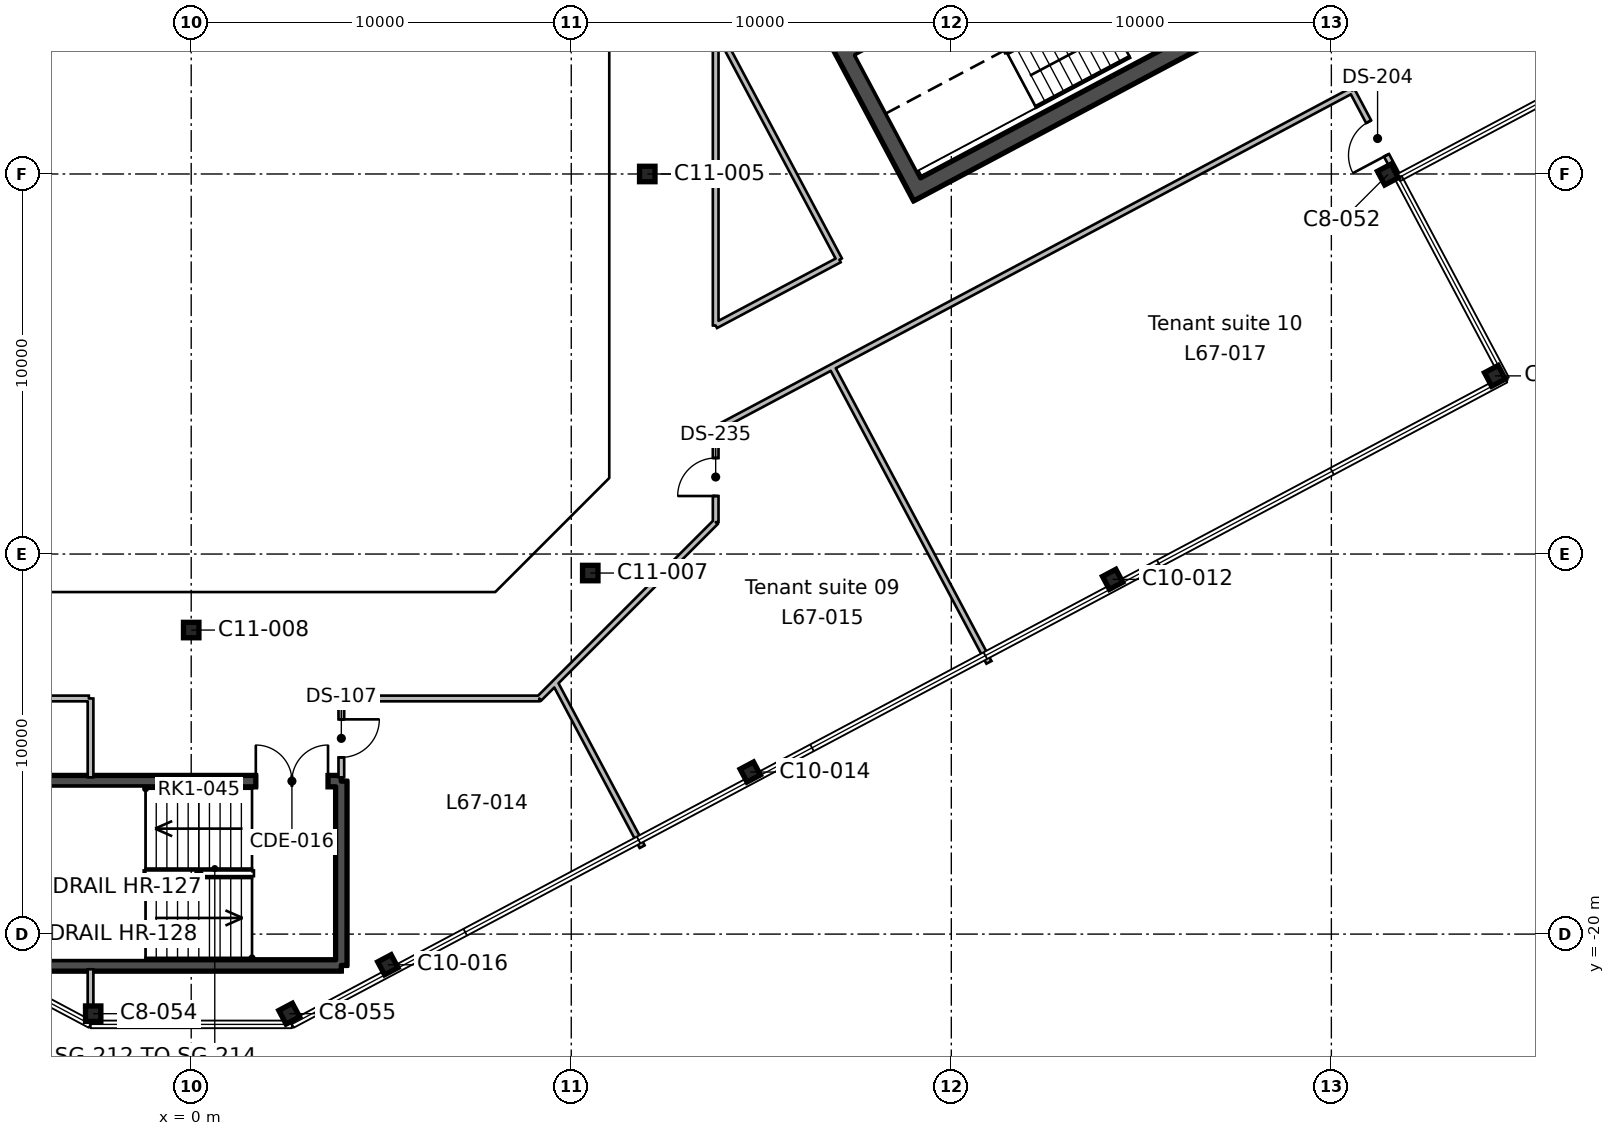
"""IFC4 building model, lengths in metres.
Left out: names, types, materials, properties, quantities, classifications, styles, units other than length and angle.
Written with IfcOpenShell. Run it as: python <this file> out.ifc"""

import sys

from ifc_helpers import new_model, si_unit, direction, frame, frame_2d, origin, origin_2d, place, context, subcontext, project, spatial, rectangle, hollow_rectangle, i_section, extrude, element, fill, save


model = new_model("IFC4")
c1 = context("Model", 3, precision=1e-05, world=origin(), true_north=direction((0.0, 1.0)))
c2 = subcontext(c1, "Body", "Model", "MODEL_VIEW")
j1 = project(units=[si_unit("LENGTHUNIT", "METRE"), si_unit("PLANEANGLEUNIT", "RADIAN")], contexts=[c1])
p1 = place(None, origin())
s1 = spatial("IfcSite", under=j1, at=p1, CompositionType="ELEMENT")
p2 = place(p1, origin())
s2 = spatial("IfcBuilding", under=s1, at=p2, CompositionType="ELEMENT")
p3 = place(p2, frame((0.0, 0.0, 297.0)))
s3 = spatial("IfcBuildingStorey", under=s2, at=p3, CompositionType="ELEMENT", Elevation=297.0)
for number, where, z_axis, x_axis in (
    (1, (-2.579, -22.094, 0.0), (0.0, 0.0, 1.0), (1.0, 0.0, 0.0)),
    (2, (2.579, -22.094, 0.0), (0.0, 0.0, 1.0), (0.883, 0.469, 0.0)),
):
    element("IfcColumn", number, at=place(p3, frame(where, z_axis=z_axis, x_axis=x_axis)), inside=s3, PredefinedType="COLUMN", context=c2, shape_type="SweptSolid", body=[
        extrude(i_section(OverallWidth=0.404, OverallDepth=0.406, WebThickness=0.027, FlangeThickness=0.044, FilletRadius=0.015, at=origin_2d()), origin(), (0.0, 0.0, 1.0), 3.9),
    ])
for number, where, z_axis, x_axis in (
    (3, (5.174, -20.807, 0.0), (0.0, 0.0, 1.0), (0.883, 0.469, 0.0)),
    (4, (14.71, -15.736, 0.0), (0.0, 0.0, 1.0), (0.883, 0.469, 0.0)),
):
    element("IfcColumn", number, at=place(p3, frame(where, z_axis=z_axis, x_axis=x_axis)), inside=s3, PredefinedType="COLUMN", context=c2, shape_type="SweptSolid", body=[
        extrude(i_section(OverallWidth=0.399, OverallDepth=0.386, WebThickness=0.021, FlangeThickness=0.033, FilletRadius=0.015, at=origin_2d()), origin(), (0.0, 0.0, 1.0), 3.9),
    ])
p4 = place(p3, frame((0.0, -12.0, 0.0), z_axis=(0.0, 0.0, 1.0), x_axis=(1.0, 0.0, 0.0)))
e5 = element("IfcColumn", 5, at=p4, inside=s3, PredefinedType="COLUMN", context=c2, shape_type="SweptSolid", body=[
    extrude(hollow_rectangle(XDim=0.406, YDim=0.406, WallThickness=0.009, InnerFilletRadius=0.004, OuterFilletRadius=0.013, at=origin_2d()), origin(), (0.0, 0.0, 1.0), 3.9),
])
p5 = place(p3, frame((24.245, -10.666, 0.0), z_axis=(0.0, 0.0, 1.0), x_axis=(0.882947592859, 0.469471562786, 0.0)))
e6 = element("IfcColumn", 6, at=p5, inside=s3, PredefinedType="COLUMN", context=c2, shape_type="SweptSolid", body=[
    extrude(i_section(OverallWidth=0.399, OverallDepth=0.386, WebThickness=0.021, FlangeThickness=0.033, FilletRadius=0.015, at=origin_2d()), origin(), (0.0, 0.0, 1.0), 3.9),
])
p6 = place(p3, frame((10.5, -10.5, 0.0), z_axis=(0.0, 0.0, 1.0), x_axis=(1.0, 0.0, 0.0)))
e7 = element("IfcColumn", 7, at=p6, inside=s3, PredefinedType="COLUMN", context=c2, shape_type="SweptSolid", body=[
    extrude(hollow_rectangle(XDim=0.406, YDim=0.406, WallThickness=0.009, InnerFilletRadius=0.004, OuterFilletRadius=0.013, at=origin_2d()), origin(), (0.0, 0.0, 1.0), 3.9),
])
for number, where, z_axis, x_axis in (
    (8, (34.304, -5.312, 0.0), (0.0, 0.0, 1.0), (-0.469, 0.883, 0.0)),
    (9, (31.487, -0.014, 0.0), (0.0, 0.0, 1.0), (0.883, 0.469, 0.0)),
):
    element("IfcColumn", number, at=place(p3, frame(where, z_axis=z_axis, x_axis=x_axis)), inside=s3, PredefinedType="COLUMN", context=c2, shape_type="SweptSolid", body=[
        extrude(i_section(OverallWidth=0.404, OverallDepth=0.406, WebThickness=0.027, FlangeThickness=0.044, FilletRadius=0.015, at=origin_2d()), origin(), (0.0, 0.0, 1.0), 3.9),
    ])
p7 = place(p3, frame((12.0, 0.0, 0.0), z_axis=(0.0, 0.0, 1.0), x_axis=(1.0, 0.0, 0.0)))
e10 = element("IfcColumn", 10, at=p7, inside=s3, PredefinedType="COLUMN", context=c2, shape_type="SweptSolid", body=[
    extrude(hollow_rectangle(XDim=0.406, YDim=0.406, WallThickness=0.009, InnerFilletRadius=0.004, OuterFilletRadius=0.013, at=origin_2d()), origin(), (0.0, 0.0, 1.0), 3.9),
])
p8 = place(p3, frame((19.207, -0.604, 0.0), z_axis=(0.0, 0.0, 1.0), x_axis=(-0.469467968382, 0.882949504028, 0.0)))
e11 = element("IfcWall", 11, at=p8, inside=s3, PredefinedType="SHEAR", context=c2, shape_type="SweptSolid", body=[
    extrude(rectangle(XDim=19.1, YDim=0.45, at=frame_2d((9.55, 0.0))), origin(), (0.0, 0.0, 1.0), 3.9),
])
p9 = place(p8, frame((6.55, 0.0, 0.0)))
e12 = element("IfcOpeningElement", 12, at=p9, cuts=e11, PredefinedType="OPENING", context=c2, shape_type="SweptSolid", body=[
    extrude(rectangle(XDim=2.4, YDim=2.4, at=frame_2d((1.2, 1.2))), frame((0.0, 0.235, 0.0), z_axis=(0.0, -1.0, 0.0), x_axis=(1.0, 0.0, 0.0)), (0.0, 0.0, 1.0), 0.47),
])
p10 = place(p3, frame((19.3, -0.299, 0.0), z_axis=(0.0, 0.0, 1.0), x_axis=(0.88295276571, 0.46946183394, 0.0)))
e13 = element("IfcWall", 13, at=p10, inside=s3, PredefinedType="SHEAR", context=c2, shape_type="SweptSolid", body=[
    extrude(rectangle(XDim=20.2, YDim=0.45, at=frame_2d((10.1, 0.0))), origin(), (0.0, 0.0, 1.0), 3.9),
])
p11 = place(p3, frame((17.434, 3.21, 0.0), z_axis=(0.0, 0.0, 1.0), x_axis=(0.882940221191, 0.469485426614, 0.0)))
e14 = element("IfcWall", 14, at=p11, inside=s3, PredefinedType="SHEAR", context=c2, shape_type="SweptSolid", body=[
    extrude(rectangle(XDim=8.0, YDim=0.2, at=frame_2d((4.0, 0.0))), origin(), (0.0, 0.0, 1.0), 3.9),
])
p12 = place(p3, frame((3.95, -15.975, 0.0), z_axis=(0.0, 0.0, 1.0), x_axis=(0.0, -1.0, 0.0)))
e15 = element("IfcWall", 15, at=p12, inside=s3, PredefinedType="SHEAR", context=c2, shape_type="SweptSolid", body=[
    extrude(rectangle(XDim=4.85, YDim=0.3, at=frame_2d((2.425, 0.0))), origin(), (0.0, 0.0, 1.0), 3.9),
])
p13 = place(p3, frame((3.95, -20.825, 0.0), z_axis=(0.0, 0.0, 1.0), x_axis=(-1.0, 0.0, 0.0)))
e16 = element("IfcWall", 16, at=p13, inside=s3, PredefinedType="SHEAR", context=c2, shape_type="SweptSolid", body=[
    extrude(rectangle(XDim=8.3, YDim=0.3, at=frame_2d((4.15, 0.0))), origin(), (0.0, 0.0, 1.0), 3.9),
])
p14 = place(p3, frame((-4.35, -15.975, 0.0), z_axis=(0.0, 0.0, 1.0), x_axis=(1.0, 0.0, 0.0)))
e17 = element("IfcWall", 17, at=p14, inside=s3, PredefinedType="SHEAR", context=c2, shape_type="SweptSolid", body=[
    extrude(rectangle(XDim=8.3, YDim=0.3, at=frame_2d((4.15, 0.0))), origin(), (0.0, 0.0, 1.0), 3.9),
])
p15 = place(p14, frame((6.05, 0.0, 0.0)))
e18 = element("IfcOpeningElement", 18, at=p15, cuts=e17, PredefinedType="OPENING", context=c2, shape_type="SweptSolid", body=[
    extrude(rectangle(XDim=1.9, YDim=2.1, at=frame_2d((0.95, 1.05))), frame((0.0, 0.16, 0.0), z_axis=(0.0, -1.0, 0.0), x_axis=(1.0, 0.0, 0.0)), (0.0, 0.0, 1.0), 0.32),
])
p16 = place(p3, frame((-2.693, -13.8, 0.0), z_axis=(0.0, 0.0, 1.0), x_axis=(-1.0, 0.0, 0.0)))
e19 = element("IfcWall", 19, at=p16, inside=s3, PredefinedType="PARTITIONING", context=c2, shape_type="SweptSolid", body=[
    extrude(rectangle(XDim=6.467, YDim=0.15, at=frame_2d((3.233, 0.0))), origin(), (0.0, 0.0, 1.0), 3.54),
])
p17 = place(p3, frame((-2.649, -15.875, 0.0), z_axis=(0.0, 0.0, 1.0), x_axis=(0.0, 1.0, 0.0)))
e20 = element("IfcWall", 20, at=p17, inside=s3, PredefinedType="PARTITIONING", context=c2, shape_type="SweptSolid", body=[
    extrude(rectangle(XDim=2.075, YDim=0.15, at=frame_2d((1.038, 0.0))), origin(), (0.0, 0.0, 1.0), 3.54),
])
p18 = place(p3, frame((-2.649, -20.925, 0.0), z_axis=(0.0, 0.0, 1.0), x_axis=(0.0, -1.0, 0.0)))
e21 = element("IfcWall", 21, at=p18, inside=s3, PredefinedType="PARTITIONING", context=c2, shape_type="SweptSolid", body=[
    extrude(rectangle(XDim=0.966, YDim=0.15, at=frame_2d((0.483, 0.0))), origin(), (0.0, 0.0, 1.0), 3.54),
])
p19 = place(p3, frame((4.954, -13.8, 0.0), z_axis=(0.0, 0.0, 1.0), x_axis=(-1.0, 0.0, 0.0)))
e22 = element("IfcWall", 22, at=p19, inside=s3, PredefinedType="PARTITIONING", context=c2, shape_type="SweptSolid", body=[
    extrude(rectangle(XDim=1.004, YDim=0.15, at=frame_2d((0.502, 0.0))), origin(), (0.0, 0.0, 1.0), 3.54),
])
p20 = place(p3, frame((3.95, -13.8, 0.0), z_axis=(0.0, 0.0, 1.0), x_axis=(0.0, -1.0, 0.0)))
e23 = element("IfcWall", 23, at=p20, inside=s3, PredefinedType="PARTITIONING", context=c2, shape_type="SweptSolid", body=[
    extrude(rectangle(XDim=2.075, YDim=0.15, at=frame_2d((1.038, 0.0))), origin(), (0.0, 0.0, 1.0), 3.54),
])
p21 = place(p20, frame((0.55, 0.0, 0.0)))
e24 = element("IfcOpeningElement", 24, at=p21, cuts=e23, PredefinedType="OPENING", context=c2, shape_type="SweptSolid", body=[
    extrude(rectangle(XDim=1.0, YDim=2.1, at=frame_2d((0.5, 1.05))), frame((0.0, 0.085, 0.0), z_axis=(0.0, -1.0, 0.0), x_axis=(1.0, 0.0, 0.0)), (0.0, 0.0, 1.0), 0.17),
])
p22 = place(p3, frame((9.16, -13.8, 0.0), z_axis=(0.0, 0.0, 1.0), x_axis=(-1.0, 0.0, 0.0)))
e25 = element("IfcWall", 25, at=p22, inside=s3, PredefinedType="PARTITIONING", context=c2, shape_type="SweptSolid", body=[
    extrude(rectangle(XDim=4.206, YDim=0.15, at=frame_2d((2.103, 0.0))), origin(), (0.0, 0.0, 1.0), 3.54),
])
p23 = place(p3, frame((9.159, -13.8, 0.0), z_axis=(0.0, 0.0, 1.0), x_axis=(0.707945081169, 0.70626748619, 0.0)))
e26 = element("IfcWall", 26, at=p23, inside=s3, PredefinedType="PARTITIONING", context=c2, shape_type="SweptSolid", body=[
    extrude(rectangle(XDim=0.582, YDim=0.15, at=frame_2d((0.291, 0.0))), origin(), (0.0, 0.0, 1.0), 3.54),
])
p24 = place(p3, frame((9.573, -13.387, 0.0), z_axis=(0.0, 0.0, 1.0), x_axis=(0.469342774431, -0.883016058795, 0.0)))
e27 = element("IfcWall", 27, at=p24, inside=s3, PredefinedType="PARTITIONING", context=c2, shape_type="SweptSolid", body=[
    extrude(rectangle(XDim=4.885, YDim=0.15, at=frame_2d((2.443, 0.0))), origin(), (0.0, 0.0, 1.0), 3.54),
])
p25 = place(p3, frame((13.8, -6.723, 0.0), z_axis=(0.0, 0.0, 1.0), x_axis=(0.0, -1.0, 0.0)))
e28 = element("IfcWall", 28, at=p25, inside=s3, PredefinedType="PARTITIONING", context=c2, shape_type="SweptSolid", body=[
    extrude(rectangle(XDim=2.437, YDim=0.15, at=frame_2d((1.219, 0.0))), origin(), (0.0, 0.0, 1.0), 3.54),
])
p26 = place(p25, frame((0.75, 0.0, 0.0)))
e29 = element("IfcOpeningElement", 29, at=p26, cuts=e28, PredefinedType="OPENING", context=c2, shape_type="SweptSolid", body=[
    extrude(rectangle(XDim=1.0, YDim=2.1, at=frame_2d((0.5, 1.05))), frame((0.0, 0.085, 0.0), z_axis=(0.0, -1.0, 0.0), x_axis=(1.0, 0.0, 0.0)), (0.0, 0.0, 1.0), 0.17),
])
p27 = place(p3, frame((13.8, -9.16, 0.0), z_axis=(0.0, 0.0, 1.0), x_axis=(-0.707187736796, -0.707025816307, 0.0)))
e30 = element("IfcWall", 30, at=p27, inside=s3, PredefinedType="PARTITIONING", context=c2, shape_type="SweptSolid", body=[
    extrude(rectangle(XDim=6.031, YDim=0.15, at=frame_2d((3.016, 0.0))), origin(), (0.0, 0.0, 1.0), 3.54),
])
p28 = place(p3, frame((16.859, -5.08, 0.0), z_axis=(0.0, 0.0, 1.0), x_axis=(0.469445946219, -0.882961212952, 0.0)))
e31 = element("IfcWall", 31, at=p28, inside=s3, PredefinedType="PARTITIONING", context=c2, shape_type="SweptSolid", body=[
    extrude(rectangle(XDim=8.8, YDim=0.15, at=frame_2d((4.4, 0.0))), origin(), (0.0, 0.0, 1.0), 3.54),
])
p29 = place(p3, frame((31.897, -0.347, 0.0), z_axis=(0.0, 0.0, 1.0), x_axis=(-0.469576437406, 0.882891822045, 0.0)))
e32 = element("IfcWall", 32, at=p29, inside=s3, PredefinedType="PARTITIONING", context=c2, shape_type="SweptSolid", body=[
    extrude(rectangle(XDim=2.881, YDim=0.15, at=frame_2d((1.441, 0.0))), origin(), (0.0, 0.0, 1.0), 3.54),
])
p30 = place(p29, frame((0.95, 0.0, 0.0)))
e33 = element("IfcOpeningElement", 33, at=p30, cuts=e32, PredefinedType="OPENING", context=c2, shape_type="SweptSolid", body=[
    extrude(rectangle(XDim=1.0, YDim=2.1, at=frame_2d((0.5, 1.05))), frame((0.0, 0.085, 0.0), z_axis=(0.0, -1.0, 0.0), x_axis=(1.0, 0.0, 0.0)), (0.0, 0.0, 1.0), 0.17),
])
p31 = place(p3, frame((30.544, 2.197, 0.0), z_axis=(0.0, 0.0, 1.0), x_axis=(-0.88294347275, -0.469479311502, 0.0)))
e34 = element("IfcWall", 34, at=p31, inside=s3, PredefinedType="PARTITIONING", context=c2, shape_type="SweptSolid", body=[
    extrude(rectangle(XDim=18.964, YDim=0.15, at=frame_2d((9.482, 0.0))), origin(), (0.0, 0.0, 1.0), 3.54),
])
p32 = place(p3, frame((13.8, -3.988, 0.0), z_axis=(0.0, 0.0, 1.0), x_axis=(0.882971660552, 0.469426295239, 0.0)))
e35 = element("IfcWall", 35, at=p32, inside=s3, PredefinedType="PARTITIONING", context=c2, shape_type="SweptSolid", body=[
    extrude(rectangle(XDim=3.688, YDim=0.15, at=frame_2d((1.844, 0.0))), origin(), (0.0, 0.0, 1.0), 3.54),
])
p33 = place(p3, frame((17.056, -2.257, 0.0), z_axis=(0.0, 0.0, 1.0), x_axis=(-0.469433160251, 0.882968010778, 0.0)))
e36 = element("IfcWall", 36, at=p33, inside=s3, PredefinedType="PARTITIONING", context=c2, shape_type="SweptSolid", body=[
    extrude(rectangle(XDim=6.936, YDim=0.15, at=frame_2d((3.468, 0.0))), origin(), (0.0, 0.0, 1.0), 3.54),
])
p34 = place(p3, frame((13.8, 3.867, 0.0), z_axis=(0.0, 0.0, 1.0), x_axis=(0.0, -1.0, 0.0)))
e37 = element("IfcWall", 37, at=p34, inside=s3, PredefinedType="PARTITIONING", context=c2, shape_type="SweptSolid", body=[
    extrude(rectangle(XDim=7.855, YDim=0.15, at=frame_2d((3.927, 0.0))), origin(), (0.0, 0.0, 1.0), 3.54),
])
p35 = place(p15, origin())
e38 = element("IfcDoor", 38, at=p35, inside=s3, OperationType="DOUBLE_DOOR_SINGLE_SWING", PredefinedType="DOOR", context=c2, shape_type="SweptSolid", body=[
    extrude(rectangle(XDim=1.9, YDim=2.1, at=frame_2d((0.95, 1.05))), frame((0.0, 0.025, 0.0), z_axis=(0.0, -1.0, 0.0), x_axis=(1.0, 0.0, 0.0)), (0.0, 0.0, 1.0), 0.05),
])
fill(e18, e38)
p36 = place(p21, origin())
e39 = element("IfcDoor", 39, at=p36, inside=s3, OperationType="SINGLE_SWING_LEFT", PredefinedType="DOOR", context=c2, shape_type="SweptSolid", body=[
    extrude(rectangle(XDim=1.0, YDim=2.1, at=frame_2d((0.5, 1.05))), frame((0.0, 0.025, 0.0), z_axis=(0.0, -1.0, 0.0), x_axis=(1.0, 0.0, 0.0)), (0.0, 0.0, 1.0), 0.05),
])
fill(e24, e39)
p37 = place(p26, frame((1.0, 0.0, 0.0), z_axis=(0.0, 0.0, 1.0), x_axis=(-1.0, 0.0, 0.0)))
e40 = element("IfcDoor", 40, at=p37, inside=s3, OperationType="SINGLE_SWING_LEFT", PredefinedType="DOOR", context=c2, shape_type="SweptSolid", body=[
    extrude(rectangle(XDim=1.0, YDim=2.1, at=frame_2d((0.5, 1.05))), frame((0.0, 0.025, 0.0), z_axis=(0.0, -1.0, 0.0), x_axis=(1.0, 0.0, 0.0)), (0.0, 0.0, 1.0), 0.05),
])
fill(e29, e40)
p38 = place(p30, origin())
e41 = element("IfcDoor", 41, at=p38, inside=s3, OperationType="SINGLE_SWING_LEFT", PredefinedType="DOOR", context=c2, shape_type="SweptSolid", body=[
    extrude(rectangle(XDim=1.0, YDim=2.1, at=frame_2d((0.5, 1.05))), frame((0.0, 0.025, 0.0), z_axis=(0.0, -1.0, 0.0), x_axis=(1.0, 0.0, 0.0)), (0.0, 0.0, 1.0), 0.05),
])
fill(e33, e41)
save(model, sys.argv[1])
